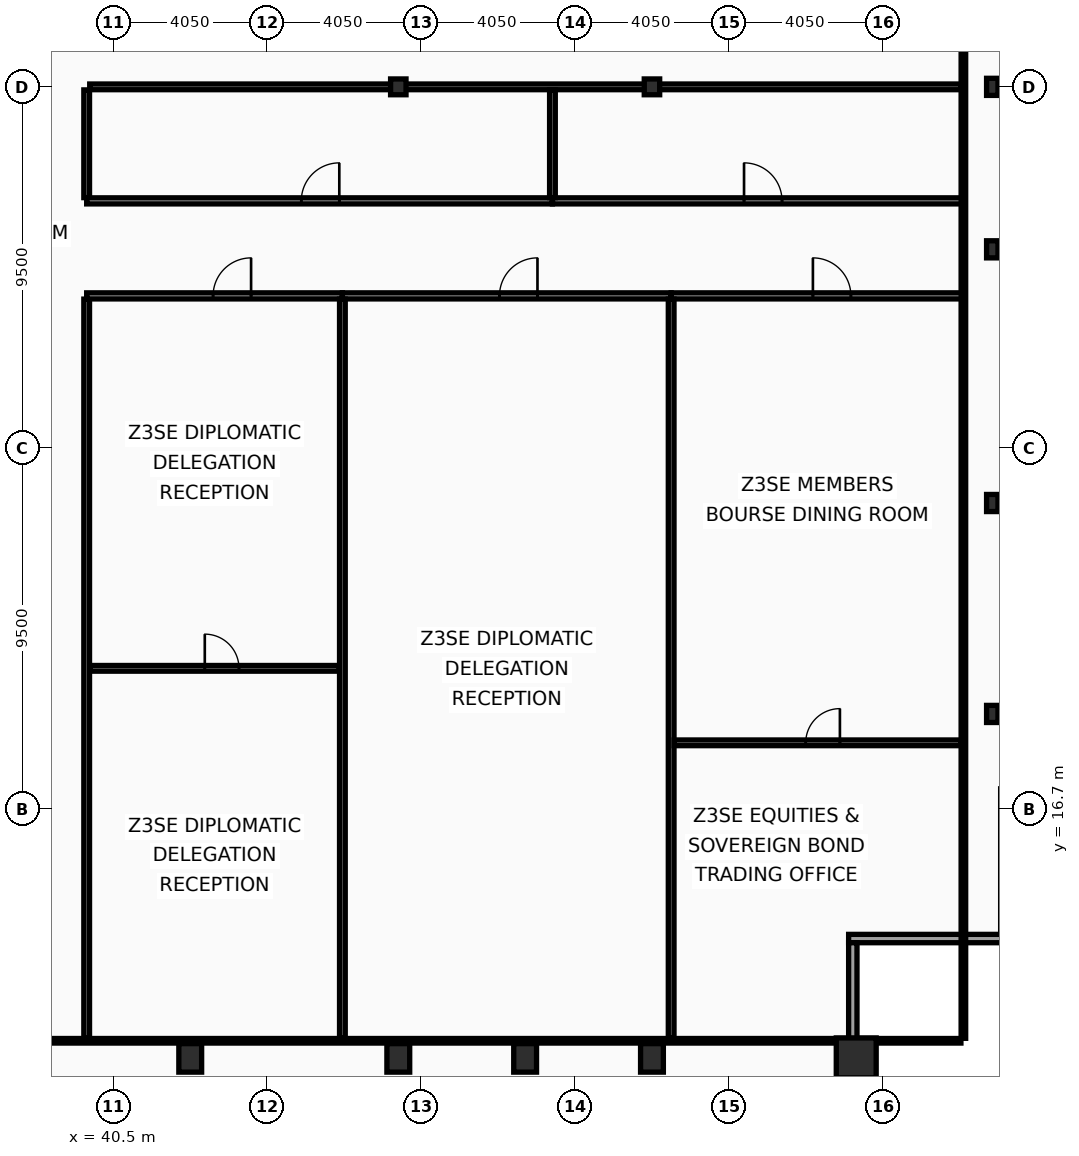
"""IFC4 building model, lengths in metres.
Left out: names, types, materials, properties, quantities, classifications, styles, units other than length and angle.
Written with IfcOpenShell. Run it as: python <this file> out.ifc"""

import sys

from ifc_helpers import new_model, si_unit, direction, frame, frame_2d, origin, origin_2d, place, context, subcontext, project, spatial, rectangle, hollow_rectangle, i_section, extrude, element, fill, save


model = new_model("IFC4")
c1 = context("Model", 3, precision=1e-05, world=origin(), true_north=direction((0.0, 1.0)))
c2 = subcontext(c1, "Body", "Model", "MODEL_VIEW")
j1 = project(units=[si_unit("LENGTHUNIT", "METRE"), si_unit("PLANEANGLEUNIT", "RADIAN")], contexts=[c1])
p1 = place(None, origin())
s1 = spatial("IfcSite", under=j1, at=p1, CompositionType="ELEMENT")
p2 = place(p1, origin())
s2 = spatial("IfcBuilding", under=s1, at=p2, CompositionType="ELEMENT")
p3 = place(p2, frame((0.0, 0.0, 261.8)))
s3 = spatial("IfcBuildingStorey", under=s2, at=p3, CompositionType="ELEMENT", Elevation=261.8)
p4 = place(p3, frame((60.05, 10.15, 0.0), z_axis=(0.0, 0.0, 1.0), x_axis=(1.0, 0.0, 0.0)))
e1 = element("IfcColumn", 1, at=p4, inside=s3, PredefinedType="COLUMN", context=c2, shape_type="SweptSolid", body=[
    extrude(hollow_rectangle(XDim=1.05, YDim=1.05, WallThickness=0.055, at=origin_2d()), origin(), (0.0, 0.0, 1.0), 3.6),
])
for number, where, z_axis, x_axis in (
    (2, (42.525, 10.15, 0.0), (0.0, 0.0, 1.0), (1.0, 0.0, 0.0)),
    (3, (48.0, 10.15, 0.0), (0.0, 0.0, 1.0), (1.0, 0.0, 0.0)),
    (4, (51.337, 10.15, 0.0), (0.0, 0.0, 1.0), (1.0, 0.0, 0.0)),
    (5, (54.675, 10.15, 0.0), (0.0, 0.0, 1.0), (1.0, 0.0, 0.0)),
):
    element("IfcColumn", number, at=place(p3, frame(where, z_axis=z_axis, x_axis=x_axis)), inside=s3, PredefinedType="COLUMN", context=c2, shape_type="SweptSolid", body=[
        extrude(hollow_rectangle(XDim=0.6, YDim=0.75, WallThickness=0.045, at=origin_2d()), origin(), (0.0, 0.0, 1.0), 3.6),
    ])
for number, where, z_axis, x_axis in (
    (6, (63.63, 19.2, 0.0), (0.0, 0.0, 1.0), (1.0, 0.0, 0.0)),
    (7, (63.63, 24.75, 0.0), (0.0, 0.0, 1.0), (1.0, 0.0, 0.0)),
    (8, (63.63, 31.425, 0.0), (0.0, 0.0, 1.0), (1.0, 0.0, 0.0)),
    (9, (63.63, 35.7, 0.0), (0.0, 0.0, 1.0), (1.0, 0.0, 0.0)),
):
    element("IfcColumn", number, at=place(p3, frame(where, z_axis=z_axis, x_axis=x_axis)), inside=s3, PredefinedType="COLUMN", context=c2, shape_type="SweptSolid", body=[
        extrude(i_section(OverallWidth=0.3, OverallDepth=0.45, WebThickness=0.014, FlangeThickness=0.026, at=origin_2d()), origin(), (0.0, 0.0, 1.0), 3.6),
    ])
for number, where, z_axis, x_axis in (
    (10, (48.0, 35.7, 0.0), (0.0, 0.0, 1.0), (1.0, 0.0, 0.0)),
    (11, (54.675, 35.7, 0.0), (0.0, 0.0, 1.0), (1.0, 0.0, 0.0)),
):
    element("IfcColumn", number, at=place(p3, frame(where, z_axis=z_axis, x_axis=x_axis)), inside=s3, PredefinedType="COLUMN", context=c2, shape_type="SweptSolid", body=[
        extrude(i_section(OverallWidth=0.406, OverallDepth=0.416, WebThickness=0.03, FlangeThickness=0.048, at=origin_2d()), origin(), (0.0, 0.0, 1.0), 3.6),
    ])
p5 = place(p3, frame((64.07, 13.29, 0.0), z_axis=(0.0, 0.0, 1.0), x_axis=(-1.0, 0.0, 0.0)))
e12 = element("IfcWall", 12, at=p5, inside=s3, PredefinedType="SOLIDWALL", context=c2, shape_type="SweptSolid", body=[
    extrude(rectangle(XDim=4.22, YDim=0.22, at=frame_2d((2.11, 0.0))), origin(), (0.0, 0.0, 1.0), 2.79),
])
p6 = place(p3, frame((59.96, 13.18, 0.0), z_axis=(0.0, 0.0, 1.0), x_axis=(0.0, -1.0, 0.0)))
e13 = element("IfcWall", 13, at=p6, inside=s3, PredefinedType="SOLIDWALL", context=c2, shape_type="SweptSolid", body=[
    extrude(rectangle(XDim=3.91, YDim=0.22, at=frame_2d((1.955, 0.0))), origin(), (0.0, 0.0, 1.0), 2.79),
])
p7 = place(p3, frame((39.8, 10.665, 0.0), z_axis=(0.0, 0.0, 1.0), x_axis=(0.0, 1.0, 0.0)))
e14 = element("IfcWall", 14, at=p7, inside=s3, PredefinedType="PARTITIONING", context=c2, shape_type="SweptSolid", body=[
    extrude(rectangle(XDim=19.45, YDim=0.15, at=frame_2d((9.725, 0.0))), origin(), (0.0, 0.0, 1.0), 2.99),
])
p8 = place(p3, frame((39.8, 32.785, 0.0), z_axis=(0.0, 0.0, 1.0), x_axis=(0.0, 1.0, 0.0)))
e15 = element("IfcWall", 15, at=p8, inside=s3, PredefinedType="PARTITIONING", context=c2, shape_type="SweptSolid", body=[
    extrude(rectangle(XDim=2.835, YDim=0.15, at=frame_2d((1.417, 0.0))), origin(), (0.0, 0.0, 1.0), 2.99),
])
p9 = place(p3, frame((39.88, 35.7, 0.0), z_axis=(0.0, 0.0, 1.0), x_axis=(1.0, 0.0, 0.0)))
e16 = element("IfcWall", 16, at=p9, inside=s3, PredefinedType="PARTITIONING", context=c2, shape_type="SweptSolid", body=[
    extrude(rectangle(XDim=22.925, YDim=0.15, at=frame_2d((11.462, 0.0))), origin(), (0.0, 0.0, 1.0), 2.74),
])
p10 = place(p3, frame((39.8, 30.2, 0.0), z_axis=(0.0, 0.0, 1.0), x_axis=(1.0, 0.0, 0.0)))
e17 = element("IfcWall", 17, at=p10, inside=s3, PredefinedType="PARTITIONING", context=c2, shape_type="SweptSolid", body=[
    extrude(rectangle(XDim=6.729, YDim=0.16, at=frame_2d((3.364, 0.0))), origin(), (0.0, 0.0, 1.0), 2.74),
])
p11 = place(p10, frame((3.326, 0.0, 0.0)))
e18 = element("IfcOpeningElement", 18, at=p11, cuts=e17, PredefinedType="OPENING", context=c2, shape_type="SweptSolid", body=[
    extrude(rectangle(XDim=1.0, YDim=2.05, at=frame_2d((0.5, 1.025))), frame((0.0, 0.09, 0.0), z_axis=(0.0, -1.0, 0.0), x_axis=(1.0, 0.0, 0.0)), (0.0, 0.0, 1.0), 0.18),
])
p12 = place(p3, frame((39.88, 20.4, 0.0), z_axis=(0.0, 0.0, 1.0), x_axis=(1.0, 0.0, 0.0)))
e19 = element("IfcWall", 19, at=p12, inside=s3, PredefinedType="PARTITIONING", context=c2, shape_type="SweptSolid", body=[
    extrude(rectangle(XDim=6.569, YDim=0.15, at=frame_2d((3.284, 0.0))), origin(), (0.0, 0.0, 1.0), 2.74),
])
p13 = place(p12, frame((3.028, 0.0, 0.0)))
e20 = element("IfcOpeningElement", 20, at=p13, cuts=e19, PredefinedType="OPENING", context=c2, shape_type="SweptSolid", body=[
    extrude(rectangle(XDim=0.9, YDim=2.05, at=frame_2d((0.45, 1.025))), frame((0.0, 0.085, 0.0), z_axis=(0.0, -1.0, 0.0), x_axis=(1.0, 0.0, 0.0)), (0.0, 0.0, 1.0), 0.17),
])
p14 = place(p3, frame((46.529, 30.2, 0.0), z_axis=(0.0, 0.0, 1.0), x_axis=(1.0, 0.0, 0.0)))
e21 = element("IfcWall", 21, at=p14, inside=s3, PredefinedType="PARTITIONING", context=c2, shape_type="SweptSolid", body=[
    extrude(rectangle(XDim=8.651, YDim=0.16, at=frame_2d((4.326, 0.0))), origin(), (0.0, 0.0, 1.0), 2.74),
])
p15 = place(p14, frame((4.134, 0.0, 0.0)))
e22 = element("IfcOpeningElement", 22, at=p15, cuts=e21, PredefinedType="OPENING", context=c2, shape_type="SweptSolid", body=[
    extrude(rectangle(XDim=1.0, YDim=2.05, at=frame_2d((0.5, 1.025))), frame((0.0, 0.09, 0.0), z_axis=(0.0, -1.0, 0.0), x_axis=(1.0, 0.0, 0.0)), (0.0, 0.0, 1.0), 0.18),
])
p16 = place(p3, frame((46.529, 10.665, 0.0), z_axis=(0.0, 0.0, 1.0), x_axis=(0.0, 1.0, 0.0)))
e23 = element("IfcWall", 23, at=p16, inside=s3, PredefinedType="PARTITIONING", context=c2, shape_type="SweptSolid", body=[
    extrude(rectangle(XDim=19.45, YDim=0.15, at=frame_2d((9.725, 0.0))), origin(), (0.0, 0.0, 1.0), 2.99),
])
p17 = place(p3, frame((55.18, 30.2, 0.0), z_axis=(0.0, 0.0, 1.0), x_axis=(1.0, 0.0, 0.0)))
e24 = element("IfcWall", 24, at=p17, inside=s3, PredefinedType="PARTITIONING", context=c2, shape_type="SweptSolid", body=[
    extrude(rectangle(XDim=7.69, YDim=0.16, at=frame_2d((3.845, 0.0))), origin(), (0.0, 0.0, 1.0), 3.4),
])
p18 = place(p17, frame((3.73, 0.0, 0.0)))
e25 = element("IfcOpeningElement", 25, at=p18, cuts=e24, PredefinedType="OPENING", context=c2, shape_type="SweptSolid", body=[
    extrude(rectangle(XDim=1.0, YDim=2.05, at=frame_2d((0.5, 1.025))), frame((0.0, 0.09, 0.0), z_axis=(0.0, -1.0, 0.0), x_axis=(1.0, 0.0, 0.0)), (0.0, 0.0, 1.0), 0.18),
])
p19 = place(p3, frame((55.18, 10.665, 0.0), z_axis=(0.0, 0.0, 1.0), x_axis=(0.0, 1.0, 0.0)))
e26 = element("IfcWall", 26, at=p19, inside=s3, PredefinedType="PARTITIONING", context=c2, shape_type="SweptSolid", body=[
    extrude(rectangle(XDim=19.45, YDim=0.15, at=frame_2d((9.725, 0.0))), origin(), (0.0, 0.0, 1.0), 2.74),
])
p20 = place(p3, frame((55.26, 18.44, 0.0), z_axis=(0.0, 0.0, 1.0), x_axis=(1.0, 0.0, 0.0)))
e27 = element("IfcWall", 27, at=p20, inside=s3, PredefinedType="PARTITIONING", context=c2, shape_type="SweptSolid", body=[
    extrude(rectangle(XDim=7.545, YDim=0.15, at=frame_2d((3.772, 0.0))), origin(), (0.0, 0.0, 1.0), 2.79),
])
p21 = place(p20, frame((3.46, 0.0, 0.0)))
e28 = element("IfcOpeningElement", 28, at=p21, cuts=e27, PredefinedType="OPENING", context=c2, shape_type="SweptSolid", body=[
    extrude(rectangle(XDim=0.9, YDim=2.05, at=frame_2d((0.45, 1.025))), frame((0.0, 0.085, 0.0), z_axis=(0.0, -1.0, 0.0), x_axis=(1.0, 0.0, 0.0)), (0.0, 0.0, 1.0), 0.17),
])
p22 = place(p3, frame((39.8, 32.7, 0.0), z_axis=(0.0, 0.0, 1.0), x_axis=(1.0, 0.0, 0.0)))
e29 = element("IfcWall", 29, at=p22, inside=s3, PredefinedType="PARTITIONING", context=c2, shape_type="SweptSolid", body=[
    extrude(rectangle(XDim=12.256, YDim=0.16, at=frame_2d((6.128, 0.0))), origin(), (0.0, 0.0, 1.0), 2.74),
])
p23 = place(p22, frame((5.647, 0.0, 0.0)))
e30 = element("IfcOpeningElement", 30, at=p23, cuts=e29, PredefinedType="OPENING", context=c2, shape_type="SweptSolid", body=[
    extrude(rectangle(XDim=1.0, YDim=2.05, at=frame_2d((0.5, 1.025))), frame((0.0, 0.09, 0.0), z_axis=(0.0, -1.0, 0.0), x_axis=(1.0, 0.0, 0.0)), (0.0, 0.0, 1.0), 0.18),
])
p24 = place(p3, frame((52.056, 32.7, 0.0), z_axis=(0.0, 0.0, 1.0), x_axis=(1.0, 0.0, 0.0)))
e31 = element("IfcWall", 31, at=p24, inside=s3, PredefinedType="PARTITIONING", context=c2, shape_type="SweptSolid", body=[
    extrude(rectangle(XDim=10.814, YDim=0.16, at=frame_2d((5.407, 0.0))), origin(), (0.0, 0.0, 1.0), 2.74),
])
p25 = place(p24, frame((5.042, 0.0, 0.0)))
e32 = element("IfcOpeningElement", 32, at=p25, cuts=e31, PredefinedType="OPENING", context=c2, shape_type="SweptSolid", body=[
    extrude(rectangle(XDim=1.0, YDim=2.05, at=frame_2d((0.5, 1.025))), frame((0.0, 0.09, 0.0), z_axis=(0.0, -1.0, 0.0), x_axis=(1.0, 0.0, 0.0)), (0.0, 0.0, 1.0), 0.18),
])
p26 = place(p3, frame((52.056, 32.785, 0.0), z_axis=(0.0, 0.0, 1.0), x_axis=(0.0, 1.0, 0.0)))
e33 = element("IfcWall", 33, at=p26, inside=s3, PredefinedType="PARTITIONING", context=c2, shape_type="SweptSolid", body=[
    extrude(rectangle(XDim=2.835, YDim=0.15, at=frame_2d((1.417, 0.0))), origin(), (0.0, 0.0, 1.0), 2.99),
])
p27 = place(p3, frame((62.87, 10.665, 0.0), z_axis=(0.0, 0.0, 1.0), x_axis=(0.0, 1.0, 0.0)))
e34 = element("IfcWall", 34, at=p27, inside=s3, PredefinedType="PARTITIONING", context=c2, shape_type="SweptSolid", body=[
    extrude(rectangle(XDim=42.11, YDim=0.12, at=frame_2d((21.055, 0.0))), origin(), (0.0, 0.0, 1.0), 2.74),
])
p28 = place(p3, frame((10.095, 10.6, 0.0), z_axis=(0.0, 0.0, 1.0), x_axis=(1.0, 0.0, 0.0)))
e35 = element("IfcWall", 35, at=p28, inside=s3, PredefinedType="PARTITIONING", context=c2, shape_type="SweptSolid", body=[
    extrude(rectangle(XDim=52.71, YDim=0.12, at=frame_2d((26.355, 0.0))), origin(), (0.0, 0.0, 1.0), 2.74),
])
p29 = place(p11, origin())
e36 = element("IfcDoor", 36, at=p29, inside=s3, OperationType="SINGLE_SWING_RIGHT", PredefinedType="DOOR", context=c2, shape_type="SweptSolid", body=[
    extrude(rectangle(XDim=1.0, YDim=2.05, at=frame_2d((0.5, 1.025))), frame((0.0, 0.025, 0.0), z_axis=(0.0, -1.0, 0.0), x_axis=(1.0, 0.0, 0.0)), (0.0, 0.0, 1.0), 0.05),
])
fill(e18, e36)
p30 = place(p13, origin())
e37 = element("IfcDoor", 37, at=p30, inside=s3, OperationType="SINGLE_SWING_LEFT", PredefinedType="DOOR", context=c2, shape_type="SweptSolid", body=[
    extrude(rectangle(XDim=0.9, YDim=2.05, at=frame_2d((0.45, 1.025))), frame((0.0, 0.025, 0.0), z_axis=(0.0, -1.0, 0.0), x_axis=(1.0, 0.0, 0.0)), (0.0, 0.0, 1.0), 0.05),
])
fill(e20, e37)
p31 = place(p15, origin())
e38 = element("IfcDoor", 38, at=p31, inside=s3, OperationType="SINGLE_SWING_RIGHT", PredefinedType="DOOR", context=c2, shape_type="SweptSolid", body=[
    extrude(rectangle(XDim=1.0, YDim=2.05, at=frame_2d((0.5, 1.025))), frame((0.0, 0.025, 0.0), z_axis=(0.0, -1.0, 0.0), x_axis=(1.0, 0.0, 0.0)), (0.0, 0.0, 1.0), 0.05),
])
fill(e22, e38)
p32 = place(p18, origin())
e39 = element("IfcDoor", 39, at=p32, inside=s3, OperationType="SINGLE_SWING_LEFT", PredefinedType="DOOR", context=c2, shape_type="SweptSolid", body=[
    extrude(rectangle(XDim=1.0, YDim=2.05, at=frame_2d((0.5, 1.025))), frame((0.0, 0.025, 0.0), z_axis=(0.0, -1.0, 0.0), x_axis=(1.0, 0.0, 0.0)), (0.0, 0.0, 1.0), 0.05),
])
fill(e25, e39)
p33 = place(p21, origin())
e40 = element("IfcDoor", 40, at=p33, inside=s3, OperationType="SINGLE_SWING_RIGHT", PredefinedType="DOOR", context=c2, shape_type="SweptSolid", body=[
    extrude(rectangle(XDim=0.9, YDim=2.05, at=frame_2d((0.45, 1.025))), frame((0.0, 0.025, 0.0), z_axis=(0.0, -1.0, 0.0), x_axis=(1.0, 0.0, 0.0)), (0.0, 0.0, 1.0), 0.05),
])
fill(e28, e40)
p34 = place(p23, origin())
e41 = element("IfcDoor", 41, at=p34, inside=s3, OperationType="SINGLE_SWING_RIGHT", PredefinedType="DOOR", context=c2, shape_type="SweptSolid", body=[
    extrude(rectangle(XDim=1.0, YDim=2.05, at=frame_2d((0.5, 1.025))), frame((0.0, 0.025, 0.0), z_axis=(0.0, -1.0, 0.0), x_axis=(1.0, 0.0, 0.0)), (0.0, 0.0, 1.0), 0.05),
])
fill(e30, e41)
p35 = place(p25, origin())
e42 = element("IfcDoor", 42, at=p35, inside=s3, OperationType="SINGLE_SWING_LEFT", PredefinedType="DOOR", context=c2, shape_type="SweptSolid", body=[
    extrude(rectangle(XDim=1.0, YDim=2.05, at=frame_2d((0.5, 1.025))), frame((0.0, 0.025, 0.0), z_axis=(0.0, -1.0, 0.0), x_axis=(1.0, 0.0, 0.0)), (0.0, 0.0, 1.0), 0.05),
])
fill(e32, e42)
save(model, sys.argv[1])
